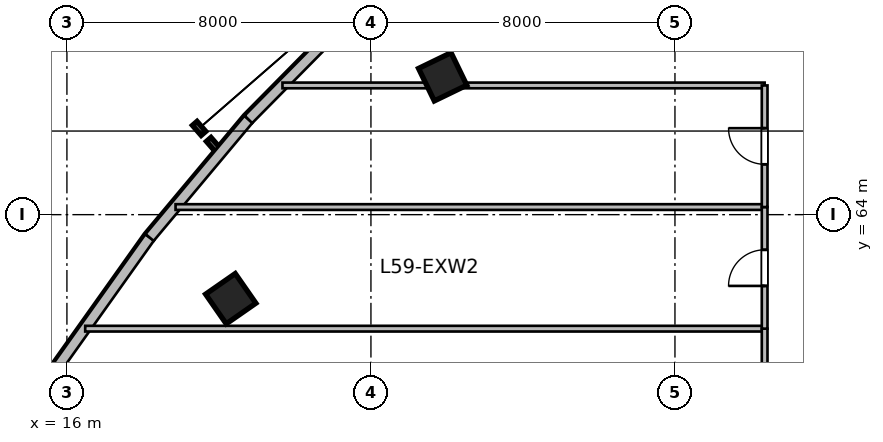
"""IFC4 building model, lengths in metres.
Left out: names, types, materials, properties, quantities, classifications, styles, units other than length and angle.
Written with IfcOpenShell. Run it as: python <this file> out.ifc"""

import sys

from ifc_helpers import new_model, si_unit, direction, frame, frame_2d, origin, origin_2d, place, context, subcontext, project, spatial, rectangle, extrude, source, transform, mapped, element, fill, save


model = new_model("IFC4")
c1 = context("Model", 3, precision=1e-05, world=origin(), true_north=direction((0.0, 1.0)))
c2 = subcontext(c1, "Body", "Model", "MODEL_VIEW")
j1 = project(units=[si_unit("LENGTHUNIT", "METRE"), si_unit("PLANEANGLEUNIT", "RADIAN")], contexts=[c1])
p1 = place(None, origin())
s1 = spatial("IfcSite", under=j1, at=p1, CompositionType="ELEMENT")
p2 = place(p1, origin())
s2 = spatial("IfcBuilding", under=s1, at=p2, CompositionType="ELEMENT")
p3 = place(p2, frame((0.0, 0.0, 243.0)))
s3 = spatial("IfcBuildingStorey", under=s2, at=p3, CompositionType="ELEMENT", Elevation=243.0)
m1 = source(origin(), c2, "Body", "SweptSolid", [
    extrude(rectangle(XDim=0.95, YDim=0.95, at=origin_2d()), origin(), (0.0, 0.0, 1.0), 3.9),
])
for number, where, z_axis, x_axis in (
    (1, (20.311, 61.789, 0.0), (0.0, 0.0, 1.0), (-0.571, 0.821, 0.0)),
    (2, (25.888, 67.627, 0.0), (0.0, 0.0, 1.0), (-0.436, 0.9, 0.0)),
):
    element("IfcColumn", number, at=place(p3, frame(where, z_axis=z_axis, x_axis=x_axis)), inside=s3, PredefinedType="COLUMN", context=c2, shape_type="MappedRepresentation", body=[
        mapped(m1, transform((0.0, 0.0, 0.0), scale=1.0)),
    ])
m2 = source(origin(), c2, "Body", "SweptSolid", [
    extrude(rectangle(XDim=4.149, YDim=0.28, at=frame_2d((2.074, 0.0))), origin(), (0.0, 0.0, 1.0), 3.65),
])
p4 = place(p3, frame((15.771, 60.019, 0.0), z_axis=(0.0, 0.0, 1.0), x_axis=(0.579622789827, 0.814884913048, 0.0)))
e3 = element("IfcWall", 3, at=p4, inside=s3, PredefinedType="SOLIDWALL", context=c2, shape_type="MappedRepresentation", body=[
    mapped(m2, transform((0.0, 0.0, 0.0), scale=1.0)),
])
m3 = source(origin(), c2, "Body", "SweptSolid", [
    extrude(rectangle(XDim=4.052, YDim=0.28, at=frame_2d((2.026, 0.0))), origin(), (0.0, 0.0, 1.0), 3.65),
])
p5 = place(p3, frame((18.176, 63.4, 0.0), z_axis=(0.0, 0.0, 1.0), x_axis=(0.641765301437, 0.76690110045, 0.0)))
e4 = element("IfcWall", 4, at=p5, inside=s3, PredefinedType="SOLIDWALL", context=c2, shape_type="MappedRepresentation", body=[
    mapped(m3, transform((0.0, 0.0, 0.0), scale=1.0)),
])
m4 = source(origin(), c2, "Body", "SweptSolid", [
    extrude(rectangle(XDim=3.955, YDim=0.28, at=frame_2d((1.978, 0.0))), origin(), (0.0, 0.0, 1.0), 3.65),
])
p6 = place(p3, frame((20.776, 66.507, 0.0), z_axis=(0.0, 0.0, 1.0), x_axis=(0.702710517474, 0.711475880569, 0.0)))
e5 = element("IfcWall", 5, at=p6, inside=s3, PredefinedType="SOLIDWALL", context=c2, shape_type="MappedRepresentation", body=[
    mapped(m4, transform((0.0, 0.0, 0.0), scale=1.0)),
])
m5 = source(origin(), c2, "Body", "SweptSolid", [
    extrude(rectangle(XDim=17.879, YDim=0.15, at=frame_2d((8.939, 0.0))), origin(), (0.0, 0.0, 1.0), 3.65),
])
p7 = place(p3, frame((16.481, 61.0, 0.0), z_axis=(0.0, 0.0, 1.0), x_axis=(1.0, 0.0, 0.0)))
e6 = element("IfcWall", 6, at=p7, inside=s3, PredefinedType="PARTITIONING", context=c2, shape_type="MappedRepresentation", body=[
    mapped(m5, transform((0.0, 0.0, 0.0), scale=1.0)),
])
m6 = source(origin(), c2, "Body", "SweptSolid", [
    extrude(rectangle(XDim=3.04, YDim=0.15, at=frame_2d((1.52, 0.0))), origin(), (0.0, 0.0, 1.0), 3.65),
])
p8 = place(p3, frame((34.36, 57.96, 0.0), z_axis=(0.0, 0.0, 1.0), x_axis=(0.0, 1.0, 0.0)))
e7 = element("IfcWall", 7, at=p8, inside=s3, PredefinedType="PARTITIONING", context=c2, shape_type="MappedRepresentation", body=[
    mapped(m6, transform((0.0, 0.0, 0.0), scale=1.0)),
])
m7 = source(origin(), c2, "Body", "SweptSolid", [
    extrude(rectangle(XDim=15.501, YDim=0.15, at=frame_2d((7.751, 0.0))), origin(), (0.0, 0.0, 1.0), 3.65),
])
p9 = place(p3, frame((18.859, 64.2, 0.0), z_axis=(0.0, 0.0, 1.0), x_axis=(1.0, 0.0, 0.0)))
e8 = element("IfcWall", 8, at=p9, inside=s3, PredefinedType="PARTITIONING", context=c2, shape_type="MappedRepresentation", body=[
    mapped(m7, transform((0.0, 0.0, 0.0), scale=1.0)),
])
m8 = source(origin(), c2, "Body", "SweptSolid", [
    extrude(rectangle(XDim=3.2, YDim=0.15, at=frame_2d((1.6, 0.0))), origin(), (0.0, 0.0, 1.0), 3.65),
])
p10 = place(p3, frame((34.36, 61.0, 0.0), z_axis=(0.0, 0.0, 1.0), x_axis=(0.0, 1.0, 0.0)))
e9 = element("IfcWall", 9, at=p10, inside=s3, PredefinedType="PARTITIONING", context=c2, shape_type="MappedRepresentation", body=[
    mapped(m8, transform((0.0, 0.0, 0.0), scale=1.0)),
])
p11 = place(p10, frame((1.125, 0.0, 0.0)))
e10 = element("IfcOpeningElement", 10, at=p11, cuts=e9, PredefinedType="OPENING", context=c2, shape_type="SweptSolid", body=[
    extrude(rectangle(XDim=0.95, YDim=2.1, at=frame_2d((0.475, 1.05))), frame((0.0, 0.085, 0.0), z_axis=(0.0, -1.0, 0.0), x_axis=(1.0, 0.0, 0.0)), (0.0, 0.0, 1.0), 0.17),
])
m9 = source(origin(), c2, "Body", "SweptSolid", [
    extrude(rectangle(XDim=12.688, YDim=0.15, at=frame_2d((6.344, 0.0))), origin(), (0.0, 0.0, 1.0), 3.65),
])
p12 = place(p3, frame((21.672, 67.4, 0.0), z_axis=(0.0, 0.0, 1.0), x_axis=(1.0, 0.0, 0.0)))
e11 = element("IfcWall", 11, at=p12, inside=s3, PredefinedType="PARTITIONING", context=c2, shape_type="MappedRepresentation", body=[
    mapped(m9, transform((0.0, 0.0, 0.0), scale=1.0)),
])
p13 = place(p3, frame((34.36, 64.2, 0.0), z_axis=(0.0, 0.0, 1.0), x_axis=(0.0, 1.0, 0.0)))
e12 = element("IfcWall", 12, at=p13, inside=s3, PredefinedType="PARTITIONING", context=c2, shape_type="MappedRepresentation", body=[
    mapped(m8, transform((0.0, 0.0, 0.0), scale=1.0)),
])
p14 = place(p13, frame((1.125, 0.0, 0.0)))
e13 = element("IfcOpeningElement", 13, at=p14, cuts=e12, PredefinedType="OPENING", context=c2, shape_type="SweptSolid", body=[
    extrude(rectangle(XDim=0.95, YDim=2.1, at=frame_2d((0.475, 1.05))), frame((0.0, 0.085, 0.0), z_axis=(0.0, -1.0, 0.0), x_axis=(1.0, 0.0, 0.0)), (0.0, 0.0, 1.0), 0.17),
])
m10 = source(origin(), c2, "Body", "SweptSolid", [
    extrude(rectangle(XDim=0.95, YDim=2.1, at=frame_2d((0.475, 1.05))), frame((0.0, 0.025, 0.0), z_axis=(0.0, -1.0, 0.0), x_axis=(1.0, 0.0, 0.0)), (0.0, 0.0, 1.0), 0.05),
])
p15 = place(p11, origin())
e14 = element("IfcDoor", 14, at=p15, inside=s3, OperationType="SINGLE_SWING_LEFT", PredefinedType="DOOR", context=c2, shape_type="MappedRepresentation", body=[
    mapped(m10, transform((0.0, 0.0, 0.0), scale=1.0)),
])
fill(e10, e14)
p16 = place(p14, origin())
e15 = element("IfcDoor", 15, at=p16, inside=s3, OperationType="SINGLE_SWING_RIGHT", PredefinedType="DOOR", context=c2, shape_type="MappedRepresentation", body=[
    mapped(m10, transform((0.0, 0.0, 0.0), scale=1.0)),
])
fill(e13, e15)
save(model, sys.argv[1])
